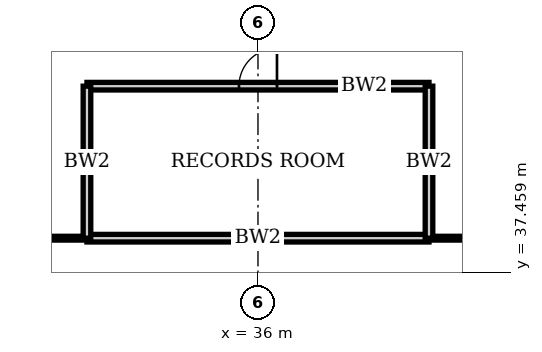
"""IFC4 building model, lengths in metres.
Left out: names, types, materials, properties, quantities, classifications, styles, units other than length and angle.
Written with IfcOpenShell. Run it as: python <this file> out.ifc"""

import sys

from ifc_helpers import new_model, si_unit, direction, frame, frame_2d, origin, place, context, subcontext, project, spatial, rectangle, extrude, element, fill, save


model = new_model("IFC4")
c1 = context("Model", 3, precision=1e-05, world=origin(), true_north=direction((0.0, 1.0)))
c2 = subcontext(c1, "Body", "Model", "MODEL_VIEW")
j1 = project(units=[si_unit("LENGTHUNIT", "METRE"), si_unit("PLANEANGLEUNIT", "RADIAN")], contexts=[c1])
p1 = place(None, origin())
s1 = spatial("IfcSite", under=j1, at=p1, CompositionType="ELEMENT")
p2 = place(p1, origin())
s2 = spatial("IfcBuilding", under=s1, at=p2, CompositionType="ELEMENT")
p3 = place(p2, frame((0.0, 0.0, 71.8)))
s3 = spatial("IfcBuildingStorey", under=s2, at=p3, CompositionType="ELEMENT", Elevation=71.8)
p4 = place(p3, frame((31.5, 38.35, 0.0), z_axis=(0.0, 0.0, 1.0), x_axis=(1.0, 0.0, 0.0)))
e1 = element("IfcWall", 1, at=p4, inside=s3, PredefinedType="SOLIDWALL", context=c2, shape_type="SweptSolid", body=[
    extrude(rectangle(XDim=9.0, YDim=0.2, at=frame_2d((4.5, 0.0))), origin(), (0.0, 0.0, 1.0), 3.75),
])
p5 = place(p3, frame((15.65, 38.35, 0.0), z_axis=(0.0, 0.0, 1.0), x_axis=(1.0, 0.0, 0.0)))
e2 = element("IfcWall", 2, at=p5, inside=s3, PredefinedType="PARTITIONING", context=c2, shape_type="SweptSolid", body=[
    extrude(rectangle(XDim=15.85, YDim=0.1, at=frame_2d((7.925, 0.0))), origin(), (0.0, 0.0, 1.0), 3.75),
])
p6 = place(p5, frame((7.425, 0.0, 0.0)))
e3 = element("IfcOpeningElement", 3, at=p6, cuts=e2, PredefinedType="OPENING", context=c2, shape_type="SweptSolid", body=[
    extrude(rectangle(XDim=1.0, YDim=2.4, at=frame_2d((0.5, 1.2))), frame((0.0, 0.06, 0.0), z_axis=(0.0, -1.0, 0.0), x_axis=(1.0, 0.0, 0.0)), (0.0, 0.0, 1.0), 0.12),
])
p7 = place(p3, frame((40.5, 38.35, 0.0), z_axis=(0.0, 0.0, 1.0), x_axis=(1.0, 0.0, 0.0)))
e4 = element("IfcWall", 4, at=p7, inside=s3, PredefinedType="PARTITIONING", context=c2, shape_type="SweptSolid", body=[
    extrude(rectangle(XDim=6.85, YDim=0.1, at=frame_2d((3.425, 0.0))), origin(), (0.0, 0.0, 1.0), 3.75),
])
p8 = place(p3, frame((31.5, 42.35, 0.0), z_axis=(0.0, 0.0, 1.0), x_axis=(1.0, 0.0, 0.0)))
e5 = element("IfcWall", 5, at=p8, inside=s3, PredefinedType="SOLIDWALL", context=c2, shape_type="SweptSolid", body=[
    extrude(rectangle(XDim=9.0, YDim=0.2, at=frame_2d((4.5, 0.0))), origin(), (0.0, 0.0, 1.0), 3.75),
])
p9 = place(p8, frame((4.0, 0.0, 0.0)))
e6 = element("IfcOpeningElement", 6, at=p9, cuts=e5, PredefinedType="OPENING", context=c2, shape_type="SweptSolid", body=[
    extrude(rectangle(XDim=1.0, YDim=2.4, at=frame_2d((0.5, 1.2))), frame((0.0, 0.11, 0.0), z_axis=(0.0, -1.0, 0.0), x_axis=(1.0, 0.0, 0.0)), (0.0, 0.0, 1.0), 0.22),
])
for number, where, z_axis, x_axis in (
    (7, (31.5, 38.35, 0.0), (0.0, 0.0, 1.0), (0.0, 1.0, 0.0)),
    (8, (40.5, 38.35, 0.0), (0.0, 0.0, 1.0), (0.0, 1.0, 0.0)),
):
    element("IfcWall", number, at=place(p3, frame(where, z_axis=z_axis, x_axis=x_axis)), inside=s3, PredefinedType="SOLIDWALL", context=c2, shape_type="SweptSolid", body=[
        extrude(rectangle(XDim=4.0, YDim=0.2, at=frame_2d((2.0, 0.0))), origin(), (0.0, 0.0, 1.0), 3.75),
    ])
p10 = place(p9, origin())
e9 = element("IfcDoor", 9, at=p10, inside=s3, OperationType="SINGLE_SWING_LEFT", PredefinedType="DOOR", context=c2, shape_type="SweptSolid", body=[
    extrude(rectangle(XDim=1.0, YDim=2.4, at=frame_2d((0.5, 1.2))), frame((0.0, 0.035, 0.0), z_axis=(0.0, -1.0, 0.0), x_axis=(1.0, 0.0, 0.0)), (0.0, 0.0, 1.0), 0.07),
])
fill(e6, e9)
save(model, sys.argv[1])
